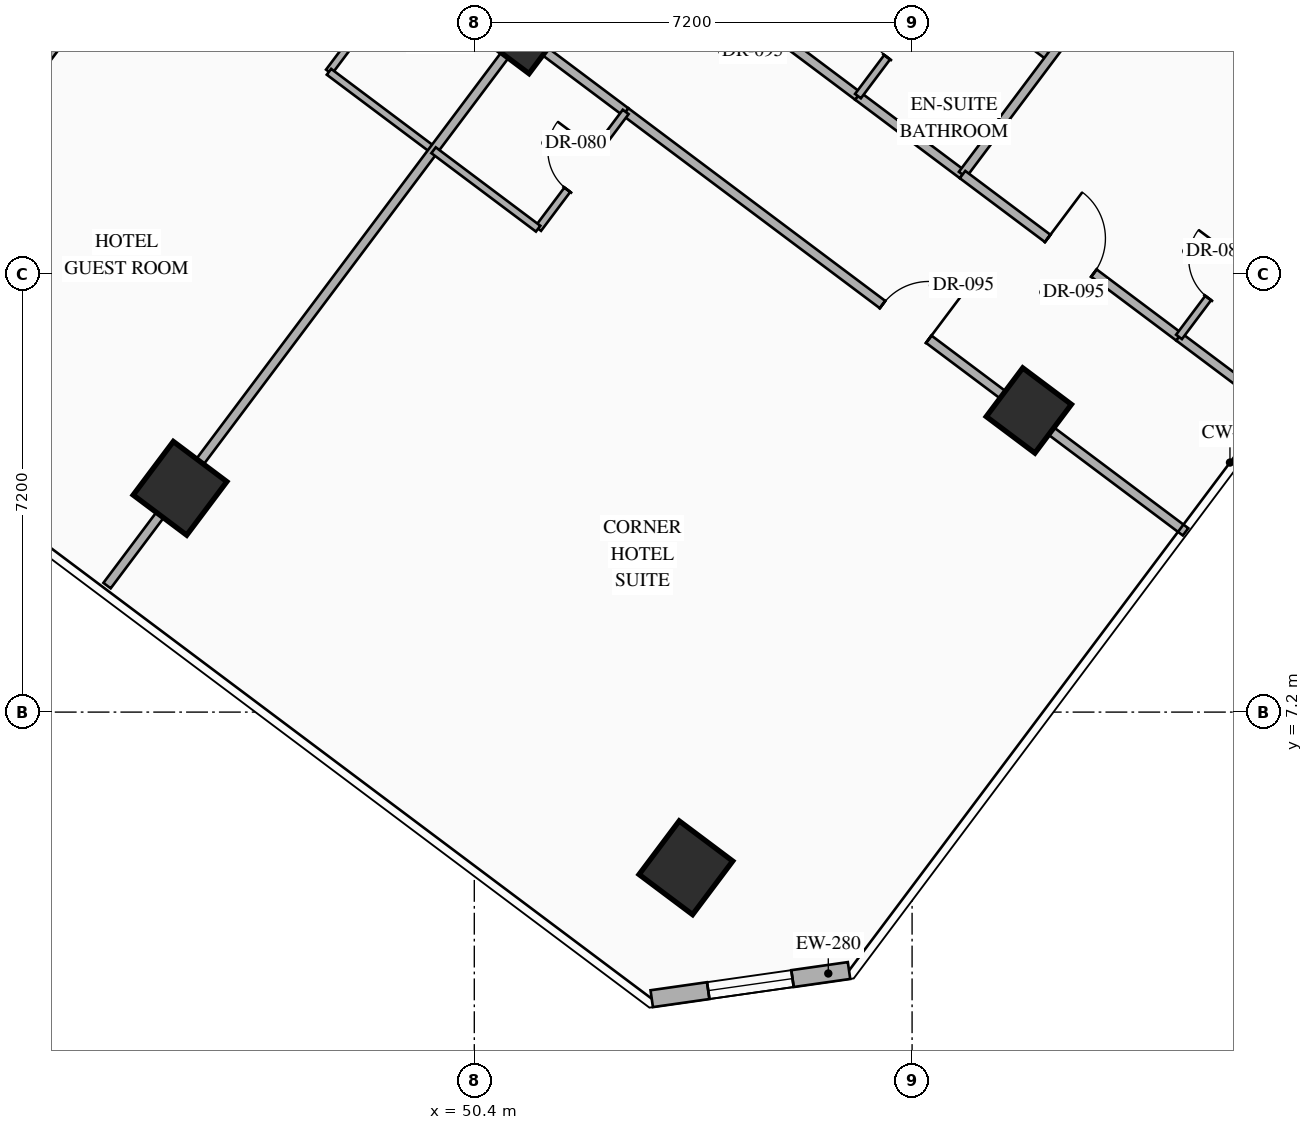
"""IFC4 building model, lengths in metres.
Left out: names, types, materials, properties, quantities, classifications, styles, units other than length and angle.
Written with IfcOpenShell. Run it as: python <this file> out.ifc"""

import sys

from ifc_helpers import new_model, si_unit, direction, frame, frame_2d, origin, origin_2d, place, context, subcontext, project, spatial, rectangle, hollow_rectangle, extrude, element, fill, save


model = new_model("IFC4")
c1 = context("Model", 3, precision=1e-05, world=origin(), true_north=direction((0.0, 1.0)))
c2 = subcontext(c1, "Body", "Model", "MODEL_VIEW")
j1 = project(units=[si_unit("LENGTHUNIT", "METRE"), si_unit("PLANEANGLEUNIT", "RADIAN")], contexts=[c1])
p1 = place(None, origin())
s1 = spatial("IfcSite", under=j1, at=p1, CompositionType="ELEMENT")
p2 = place(p1, origin())
s2 = spatial("IfcBuilding", under=s1, at=p2, CompositionType="ELEMENT")
p3 = place(p2, frame((0.0, 0.0, 66.75)))
s3 = spatial("IfcBuildingStorey", under=s2, at=p3, CompositionType="ELEMENT", Elevation=66.75)
p4 = place(p3, frame((45.56, 10.88, 0.0), z_axis=(0.0, 0.0, 1.0), x_axis=(0.799999996291, -0.600000004945, 0.0)))
e1 = element("IfcColumn", 1, at=p4, inside=s3, PredefinedType="COLUMN", context=c2, shape_type="SweptSolid", body=[
    extrude(hollow_rectangle(XDim=1.1, YDim=1.1, WallThickness=0.04, at=origin_2d()), origin(), (0.0, 0.0, 1.0), 3.35),
])
p5 = place(p3, frame((51.2, 18.4, 0.0), z_axis=(0.0, 0.0, 1.0), x_axis=(0.799999996291, -0.600000004945, 0.0)))
e2 = element("IfcColumn", 2, at=p5, inside=s3, PredefinedType="COLUMN", context=c2, shape_type="SweptSolid", body=[
    extrude(hollow_rectangle(XDim=1.0, YDim=1.0, WallThickness=0.038, at=origin_2d()), origin(), (0.0, 0.0, 1.0), 3.35),
])
p6 = place(p3, frame((53.88, 4.64, 0.0), z_axis=(0.0, 0.0, 1.0), x_axis=(0.799999996291, -0.600000004945, 0.0)))
e3 = element("IfcColumn", 3, at=p6, inside=s3, PredefinedType="COLUMN", context=c2, shape_type="SweptSolid", body=[
    extrude(hollow_rectangle(XDim=1.1, YDim=1.1, WallThickness=0.04, at=origin_2d()), origin(), (0.0, 0.0, 1.0), 3.35),
])
p7 = place(p3, frame((59.52, 12.16, 0.0), z_axis=(0.0, 0.0, 1.0), x_axis=(0.799999996291, -0.600000004945, 0.0)))
e4 = element("IfcColumn", 4, at=p7, inside=s3, PredefinedType="COLUMN", context=c2, shape_type="SweptSolid", body=[
    extrude(hollow_rectangle(XDim=1.0, YDim=1.0, WallThickness=0.038, at=origin_2d()), origin(), (0.0, 0.0, 1.0), 3.35),
])
p8 = place(p3, frame((56.563, 2.95, 0.0), z_axis=(0.0, 0.0, 1.0), x_axis=(-0.989977778067, -0.141223223777, 0.0)))
e5 = element("IfcWall", 5, at=p8, inside=s3, PredefinedType="STANDARD", context=c2, shape_type="SweptSolid", body=[
    extrude(rectangle(XDim=3.278, YDim=0.28, at=frame_2d((1.639, 0.0))), origin(), (0.0, 0.0, 1.0), 3.09),
])
p9 = place(p8, frame((0.939, 0.0, 0.85)))
e6 = element("IfcOpeningElement", 6, at=p9, cuts=e5, PredefinedType="OPENING", context=c2, shape_type="SweptSolid", body=[
    extrude(rectangle(XDim=1.4, YDim=1.8, at=frame_2d((0.7, 0.9))), frame((0.0, 0.15, 0.0), z_axis=(0.0, -1.0, 0.0), x_axis=(1.0, 0.0, 0.0)), (0.0, 0.0, 1.0), 0.3),
])
p10 = place(p3, frame((39.464, 12.752, 0.0), z_axis=(0.0, 0.0, 1.0), x_axis=(0.6, 0.8, 0.0)))
e7 = element("IfcWall", 7, at=p10, inside=s3, PredefinedType="PARTITIONING", context=c2, shape_type="SweptSolid", body=[
    extrude(rectangle(XDim=11.51, YDim=0.15, at=frame_2d((5.755, 0.0))), origin(), (0.0, 0.0, 1.0), 3.09),
])
p11 = place(p3, frame((53.15, 20.0, 0.0), z_axis=(0.0, 0.0, 1.0), x_axis=(0.800013166942, -0.599982443676, 0.0)))
e8 = element("IfcWall", 8, at=p11, inside=s3, PredefinedType="PARTITIONING", context=c2, shape_type="SweptSolid", body=[
    extrude(rectangle(XDim=4.45, YDim=0.15, at=frame_2d((2.225, 0.0))), origin(), (0.0, 0.0, 1.0), 2.775),
])
p12 = place(p11, frame((1.75, 0.0, 0.0)))
e9 = element("IfcOpeningElement", 9, at=p12, cuts=e8, PredefinedType="OPENING", context=c2, shape_type="SweptSolid", body=[
    extrude(rectangle(XDim=0.95, YDim=2.15, at=frame_2d((0.475, 1.075))), frame((0.0, 0.085, 0.0), z_axis=(0.0, -1.0, 0.0), x_axis=(1.0, 0.0, 0.0)), (0.0, 0.0, 1.0), 0.17),
])
p13 = place(p3, frame((56.71, 17.33, 0.0), z_axis=(0.0, 0.0, 1.0), x_axis=(0.79998637334, -0.60001816845, 0.0)))
e10 = element("IfcWall", 10, at=p13, inside=s3, PredefinedType="PARTITIONING", context=c2, shape_type="SweptSolid", body=[
    extrude(rectangle(XDim=2.15, YDim=0.15, at=frame_2d((1.075, 0.0))), origin(), (0.0, 0.0, 1.0), 2.775),
])
p14 = place(p3, frame((56.71, 17.33, 0.0), z_axis=(0.0, 0.0, 1.0), x_axis=(0.6, 0.8, 0.0)))
e11 = element("IfcWall", 11, at=p14, inside=s3, PredefinedType="PARTITIONING", context=c2, shape_type="SweptSolid", body=[
    extrude(rectangle(XDim=2.4, YDim=0.12, at=frame_2d((1.2, 0.0))), origin(), (0.0, 0.0, 1.0), 3.09),
])
p15 = place(p14, frame((0.8, 0.0, 0.0)))
e12 = element("IfcOpeningElement", 12, at=p15, cuts=e11, PredefinedType="OPENING", context=c2, shape_type="SweptSolid", body=[
    extrude(rectangle(XDim=0.8, YDim=2.06, at=frame_2d((0.4, 1.03))), frame((0.0, 0.07, 0.0), z_axis=(0.0, -1.0, 0.0), x_axis=(1.0, 0.0, 0.0)), (0.0, 0.0, 1.0), 0.14),
])
p16 = place(p3, frame((58.15, 19.25, 0.0), z_axis=(0.0, 0.0, 1.0), x_axis=(0.800027249606, -0.599963665473, 0.0)))
e13 = element("IfcWall", 13, at=p16, inside=s3, PredefinedType="PARTITIONING", context=c2, shape_type="SweptSolid", body=[
    extrude(rectangle(XDim=2.15, YDim=0.12, at=frame_2d((1.075, 0.0))), origin(), (0.0, 0.0, 1.0), 3.09),
])
p17 = place(p3, frame((58.43, 16.04, 0.0), z_axis=(0.0, 0.0, 1.0), x_axis=(0.60001014597, 0.799992390422, 0.0)))
e14 = element("IfcWall", 14, at=p17, inside=s3, PredefinedType="PARTITIONING", context=c2, shape_type="SweptSolid", body=[
    extrude(rectangle(XDim=11.55, YDim=0.15, at=frame_2d((5.775, 0.0))), origin(), (0.0, 0.0, 1.0), 3.09),
])
p18 = place(p3, frame((58.43, 16.04, 0.0), z_axis=(0.0, 0.0, 1.0), x_axis=(0.800013166942, -0.599982443676, 0.0)))
e15 = element("IfcWall", 15, at=p18, inside=s3, PredefinedType="PARTITIONING", context=c2, shape_type="SweptSolid", body=[
    extrude(rectangle(XDim=4.45, YDim=0.15, at=frame_2d((2.225, 0.0))), origin(), (0.0, 0.0, 1.0), 2.775),
])
p19 = place(p18, frame((1.75, 0.0, 0.0)))
e16 = element("IfcOpeningElement", 16, at=p19, cuts=e15, PredefinedType="OPENING", context=c2, shape_type="SweptSolid", body=[
    extrude(rectangle(XDim=0.95, YDim=2.15, at=frame_2d((0.475, 1.075))), frame((0.0, 0.085, 0.0), z_axis=(0.0, -1.0, 0.0), x_axis=(1.0, 0.0, 0.0)), (0.0, 0.0, 1.0), 0.17),
])
p20 = place(p3, frame((61.99, 13.37, 0.0), z_axis=(0.0, 0.0, 1.0), x_axis=(0.79997084737, -0.600038868206, 0.0)))
e17 = element("IfcWall", 17, at=p20, inside=s3, PredefinedType="PARTITIONING", context=c2, shape_type="SweptSolid", body=[
    extrude(rectangle(XDim=2.01, YDim=0.15, at=frame_2d((1.005, 0.0))), origin(), (0.0, 0.0, 1.0), 3.09),
])
p21 = place(p3, frame((61.99, 13.37, 0.0), z_axis=(0.0, 0.0, 1.0), x_axis=(0.6, 0.8, 0.0)))
e18 = element("IfcWall", 18, at=p21, inside=s3, PredefinedType="PARTITIONING", context=c2, shape_type="SweptSolid", body=[
    extrude(rectangle(XDim=2.4, YDim=0.12, at=frame_2d((1.2, 0.0))), origin(), (0.0, 0.0, 1.0), 3.09),
])
p22 = place(p21, frame((0.8, 0.0, 0.0)))
e19 = element("IfcOpeningElement", 19, at=p22, cuts=e18, PredefinedType="OPENING", context=c2, shape_type="SweptSolid", body=[
    extrude(rectangle(XDim=0.8, YDim=2.06, at=frame_2d((0.4, 1.03))), frame((0.0, 0.07, 0.0), z_axis=(0.0, -1.0, 0.0), x_axis=(1.0, 0.0, 0.0)), (0.0, 0.0, 1.0), 0.14),
])
p23 = place(p3, frame((48.01, 17.73, 0.0), z_axis=(0.0, 0.0, 1.0), x_axis=(0.6, 0.8, 0.0)))
e20 = element("IfcWall", 20, at=p23, inside=s3, PredefinedType="PARTITIONING", context=c2, shape_type="SweptSolid", body=[
    extrude(rectangle(XDim=2.4, YDim=0.12, at=frame_2d((1.2, 0.0))), origin(), (0.0, 0.0, 1.0), 3.09),
])
p24 = place(p23, frame((0.8, 0.0, 0.0)))
e21 = element("IfcOpeningElement", 21, at=p24, cuts=e20, PredefinedType="OPENING", context=c2, shape_type="SweptSolid", body=[
    extrude(rectangle(XDim=0.8, YDim=2.06, at=frame_2d((0.4, 1.03))), frame((0.0, 0.07, 0.0), z_axis=(0.0, -1.0, 0.0), x_axis=(1.0, 0.0, 0.0)), (0.0, 0.0, 1.0), 0.14),
])
p25 = place(p3, frame((48.01, 17.73, 0.0), z_axis=(0.0, 0.0, 1.0), x_axis=(0.79998637334, -0.60001816845, 0.0)))
e22 = element("IfcWall", 22, at=p25, inside=s3, PredefinedType="PARTITIONING", context=c2, shape_type="SweptSolid", body=[
    extrude(rectangle(XDim=2.15, YDim=0.12, at=frame_2d((1.075, 0.0))), origin(), (0.0, 0.0, 1.0), 3.09),
])
p26 = place(p3, frame((44.36, 9.28, 0.0), z_axis=(0.0, 0.0, 1.0), x_axis=(0.599986233332, 0.800010324816, 0.0)))
e23 = element("IfcWall", 23, at=p26, inside=s3, PredefinedType="PARTITIONING", context=c2, shape_type="SweptSolid", body=[
    extrude(rectangle(XDim=11.35, YDim=0.15, at=frame_2d((5.675, 0.0))), origin(), (0.0, 0.0, 1.0), 2.425),
])
p27 = place(p3, frame((51.17, 18.36, 0.0), z_axis=(0.0, 0.0, 1.0), x_axis=(0.79998637334, -0.60001816845, 0.0)))
e24 = element("IfcWall", 24, at=p27, inside=s3, PredefinedType="PARTITIONING", context=c2, shape_type="SweptSolid", body=[
    extrude(rectangle(XDim=2.15, YDim=0.15, at=frame_2d((1.075, 0.0))), origin(), (0.0, 0.0, 1.0), 2.425),
])
p28 = place(p3, frame((52.89, 17.07, 0.0), z_axis=(0.0, 0.0, 1.0), x_axis=(0.8, -0.6, 0.0)))
e25 = element("IfcWall", 25, at=p28, inside=s3, PredefinedType="PARTITIONING", context=c2, shape_type="SweptSolid", body=[
    extrude(rectangle(XDim=11.51, YDim=0.15, at=frame_2d((5.755, 0.0))), origin(), (0.0, 0.0, 1.0), 2.425),
])
p29 = place(p28, frame((5.28, 0.0, 0.0)))
e26 = element("IfcOpeningElement", 26, at=p29, cuts=e25, PredefinedType="OPENING", context=c2, shape_type="SweptSolid", body=[
    extrude(rectangle(XDim=0.95, YDim=2.15, at=frame_2d((0.475, 1.075))), frame((0.0, 0.085, 0.0), z_axis=(0.0, -1.0, 0.0), x_axis=(1.0, 0.0, 0.0)), (0.0, 0.0, 1.0), 0.17),
])
p30 = place(p3, frame((51.45, 15.15, 0.0), z_axis=(0.0, 0.0, 1.0), x_axis=(0.599951172744, 0.800036618114, 0.0)))
e27 = element("IfcWall", 27, at=p30, inside=s3, PredefinedType="PARTITIONING", context=c2, shape_type="SweptSolid", body=[
    extrude(rectangle(XDim=2.4, YDim=0.12, at=frame_2d((1.2, 0.0))), origin(), (0.0, 0.0, 1.0), 3.09),
])
p31 = place(p30, frame((0.8, 0.0, 0.0)))
e28 = element("IfcOpeningElement", 28, at=p31, cuts=e27, PredefinedType="OPENING", context=c2, shape_type="SweptSolid", body=[
    extrude(rectangle(XDim=0.8, YDim=2.06, at=frame_2d((0.4, 1.03))), frame((0.0, 0.07, 0.0), z_axis=(0.0, -1.0, 0.0), x_axis=(1.0, 0.0, 0.0)), (0.0, 0.0, 1.0), 0.14),
])
p32 = place(p3, frame((49.73, 16.44, 0.0), z_axis=(0.0, 0.0, 1.0), x_axis=(0.79998637334, -0.60001816845, 0.0)))
e29 = element("IfcWall", 29, at=p32, inside=s3, PredefinedType="PARTITIONING", context=c2, shape_type="SweptSolid", body=[
    extrude(rectangle(XDim=2.15, YDim=0.12, at=frame_2d((1.075, 0.0))), origin(), (0.0, 0.0, 1.0), 3.09),
])
p33 = place(p9, origin())
e30 = element("IfcWindow", 30, at=p33, inside=s3, PartitioningType="SINGLE_PANEL", PredefinedType="WINDOW", context=c2, shape_type="SweptSolid", body=[
    extrude(rectangle(XDim=1.4, YDim=1.8, at=frame_2d((0.7, 0.9))), frame((0.0, 0.03, 0.0), z_axis=(0.0, -1.0, 0.0), x_axis=(1.0, 0.0, 0.0)), (0.0, 0.0, 1.0), 0.06),
])
fill(e6, e30)
p34 = place(p15, origin())
e31 = element("IfcDoor", 31, at=p34, inside=s3, OperationType="SINGLE_SWING_RIGHT", PredefinedType="DOOR", context=c2, shape_type="SweptSolid", body=[
    extrude(rectangle(XDim=0.8, YDim=2.06, at=frame_2d((0.4, 1.03))), frame((0.0, 0.025, 0.0), z_axis=(0.0, -1.0, 0.0), x_axis=(1.0, 0.0, 0.0)), (0.0, 0.0, 1.0), 0.05),
])
fill(e12, e31)
p35 = place(p19, origin())
e32 = element("IfcDoor", 32, at=p35, inside=s3, OperationType="SINGLE_SWING_LEFT", PredefinedType="DOOR", context=c2, shape_type="SweptSolid", body=[
    extrude(rectangle(XDim=0.95, YDim=2.15, at=frame_2d((0.475, 1.075))), frame((0.0, 0.025, 0.0), z_axis=(0.0, -1.0, 0.0), x_axis=(1.0, 0.0, 0.0)), (0.0, 0.0, 1.0), 0.05),
])
fill(e16, e32)
p36 = place(p22, origin())
e33 = element("IfcDoor", 33, at=p36, inside=s3, OperationType="SINGLE_SWING_RIGHT", PredefinedType="DOOR", context=c2, shape_type="SweptSolid", body=[
    extrude(rectangle(XDim=0.8, YDim=2.06, at=frame_2d((0.4, 1.03))), frame((0.0, 0.025, 0.0), z_axis=(0.0, -1.0, 0.0), x_axis=(1.0, 0.0, 0.0)), (0.0, 0.0, 1.0), 0.05),
])
fill(e19, e33)
p37 = place(p29, origin())
e34 = element("IfcDoor", 34, at=p37, inside=s3, OperationType="SINGLE_SWING_RIGHT", PredefinedType="DOOR", context=c2, shape_type="SweptSolid", body=[
    extrude(rectangle(XDim=0.95, YDim=2.15, at=frame_2d((0.475, 1.075))), frame((0.0, 0.025, 0.0), z_axis=(0.0, -1.0, 0.0), x_axis=(1.0, 0.0, 0.0)), (0.0, 0.0, 1.0), 0.05),
])
fill(e26, e34)
p38 = place(p31, origin())
e35 = element("IfcDoor", 35, at=p38, inside=s3, OperationType="SINGLE_SWING_RIGHT", PredefinedType="DOOR", context=c2, shape_type="SweptSolid", body=[
    extrude(rectangle(XDim=0.8, YDim=2.06, at=frame_2d((0.4, 1.03))), frame((0.0, 0.025, 0.0), z_axis=(0.0, -1.0, 0.0), x_axis=(1.0, 0.0, 0.0)), (0.0, 0.0, 1.0), 0.05),
])
fill(e28, e35)
save(model, sys.argv[1])
